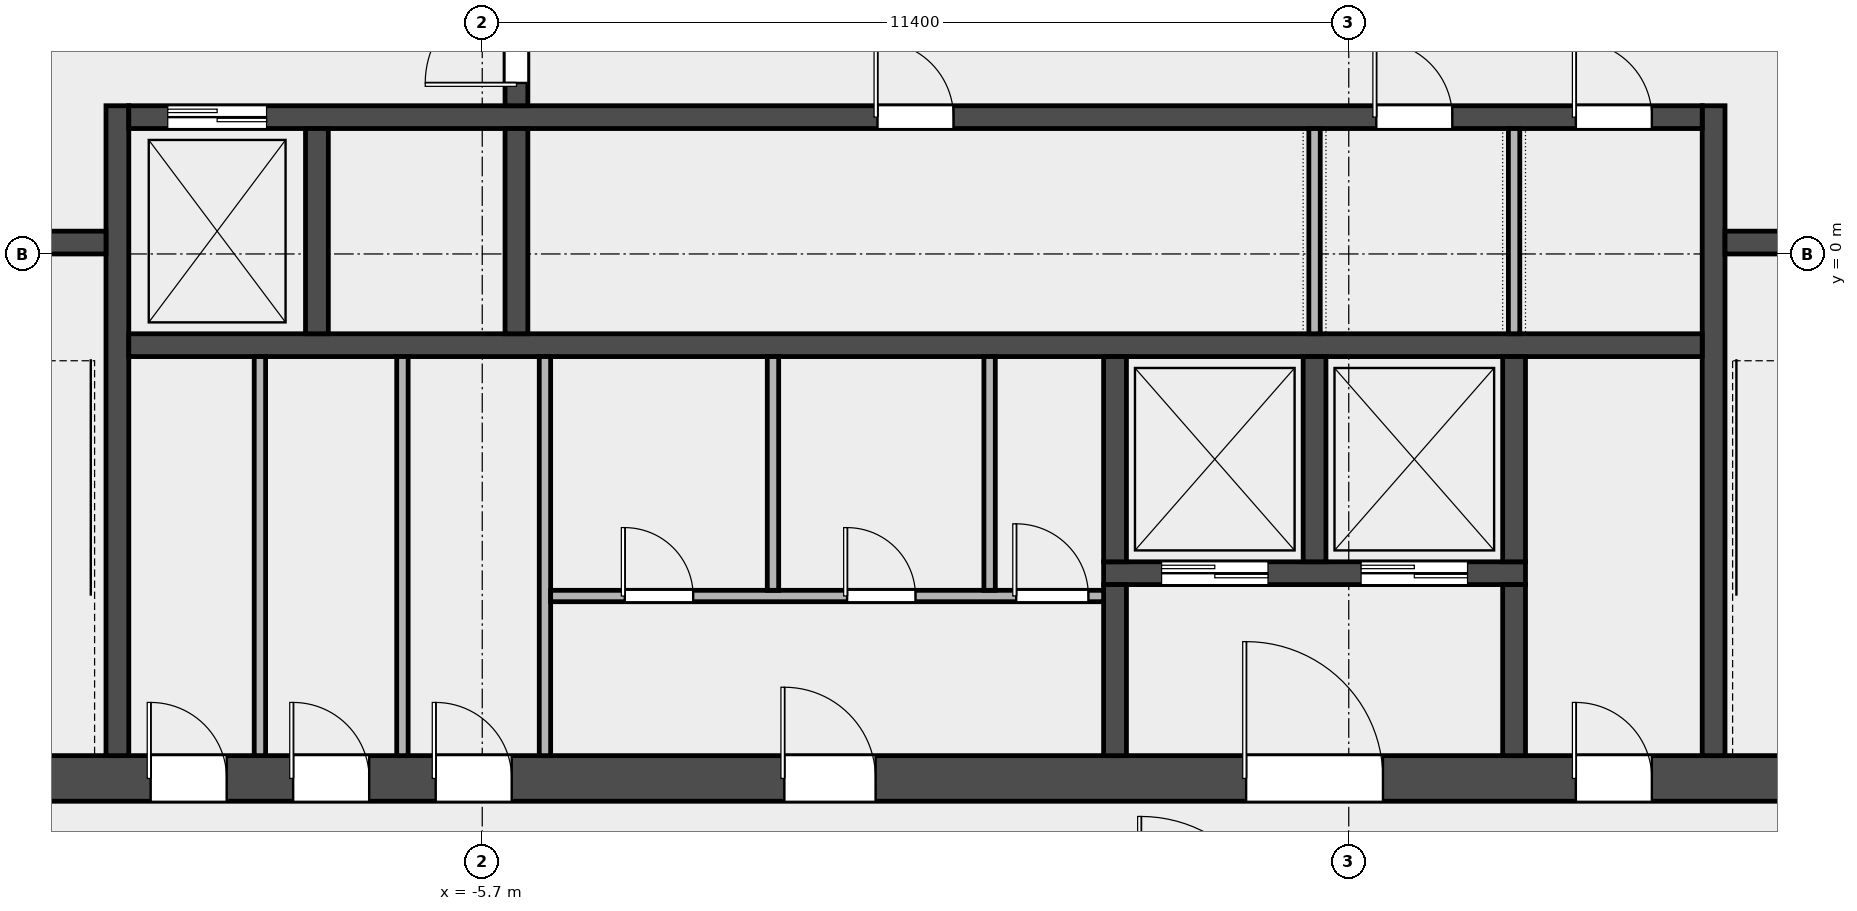
"""IFC4 building model, lengths in metres.
Left out: names, types, materials, properties, quantities, classifications, styles, units other than length and angle.
Written with IfcOpenShell. Run it as: python <this file> out.ifc"""

import sys

from ifc_helpers import new_model, si_unit, direction, frame, frame_2d, origin, place, context, subcontext, project, spatial, rectangle, extrude, element, fill, save


model = new_model("IFC4")
c1 = context("Model", 3, precision=1e-05, world=origin(), true_north=direction((0.0, 1.0)))
c2 = subcontext(c1, "Body", "Model", "MODEL_VIEW")
j1 = project(units=[si_unit("LENGTHUNIT", "METRE"), si_unit("PLANEANGLEUNIT", "RADIAN")], contexts=[c1])
p1 = place(None, origin())
s1 = spatial("IfcSite", under=j1, at=p1, CompositionType="ELEMENT")
p2 = place(p1, origin())
s2 = spatial("IfcBuilding", under=s1, at=p2, CompositionType="ELEMENT")
p3 = place(p2, frame((0.0, 0.0, 227.0)))
s3 = spatial("IfcBuildingStorey", under=s2, at=p3, CompositionType="ELEMENT", Elevation=227.0)
p4 = place(p3, frame((-14.4, -6.9, 0.0), z_axis=(0.0, 0.0, 1.0), x_axis=(1.0, 0.0, 0.0)))
e1 = element("IfcWall", 1, at=p4, inside=s3, PredefinedType="SHEAR", context=c2, shape_type="SweptSolid", body=[
    extrude(rectangle(XDim=28.8, YDim=0.6, at=frame_2d((14.4, 0.0))), origin(), (0.0, 0.0, 1.0), 3.7),
])
p5 = place(p4, frame((4.337, 0.0, 0.0)))
e2 = element("IfcOpeningElement", 2, at=p5, cuts=e1, PredefinedType="OPENING", context=c2, shape_type="SweptSolid", body=[
    extrude(rectangle(XDim=1.0, YDim=2.1, at=frame_2d((0.5, 1.05))), frame((0.0, 0.312, 0.0), z_axis=(0.0, -1.0, 0.0), x_axis=(1.0, 0.0, 0.0)), (0.0, 0.0, 1.0), 0.624),
])
p6 = place(p4, frame((6.212, 0.0, 0.0)))
e3 = element("IfcOpeningElement", 3, at=p6, cuts=e1, PredefinedType="OPENING", context=c2, shape_type="SweptSolid", body=[
    extrude(rectangle(XDim=1.0, YDim=2.1, at=frame_2d((0.5, 1.05))), frame((0.0, 0.312, 0.0), z_axis=(0.0, -1.0, 0.0), x_axis=(1.0, 0.0, 0.0)), (0.0, 0.0, 1.0), 0.624),
])
p7 = place(p4, frame((8.087, 0.0, 0.0)))
e4 = element("IfcOpeningElement", 4, at=p7, cuts=e1, PredefinedType="OPENING", context=c2, shape_type="SweptSolid", body=[
    extrude(rectangle(XDim=1.0, YDim=2.1, at=frame_2d((0.5, 1.05))), frame((0.0, 0.312, 0.0), z_axis=(0.0, -1.0, 0.0), x_axis=(1.0, 0.0, 0.0)), (0.0, 0.0, 1.0), 0.624),
])
p8 = place(p4, frame((12.675, 0.0, 0.0)))
e5 = element("IfcOpeningElement", 5, at=p8, cuts=e1, PredefinedType="OPENING", context=c2, shape_type="SweptSolid", body=[
    extrude(rectangle(XDim=1.2, YDim=2.1, at=frame_2d((0.6, 1.05))), frame((0.0, 0.312, 0.0), z_axis=(0.0, -1.0, 0.0), x_axis=(1.0, 0.0, 0.0)), (0.0, 0.0, 1.0), 0.624),
])
p9 = place(p4, frame((18.75, 0.0, 0.0)))
e6 = element("IfcOpeningElement", 6, at=p9, cuts=e1, PredefinedType="OPENING", context=c2, shape_type="SweptSolid", body=[
    extrude(rectangle(XDim=1.8, YDim=2.1, at=frame_2d((0.9, 1.05))), frame((0.0, 0.312, 0.0), z_axis=(0.0, -1.0, 0.0), x_axis=(1.0, 0.0, 0.0)), (0.0, 0.0, 1.0), 0.624),
])
p10 = place(p4, frame((23.087, 0.0, 0.0)))
e7 = element("IfcOpeningElement", 7, at=p10, cuts=e1, PredefinedType="OPENING", context=c2, shape_type="SweptSolid", body=[
    extrude(rectangle(XDim=1.0, YDim=2.1, at=frame_2d((0.5, 1.05))), frame((0.0, 0.312, 0.0), z_axis=(0.0, -1.0, 0.0), x_axis=(1.0, 0.0, 0.0)), (0.0, 0.0, 1.0), 0.624),
])
for number, where, z_axis, x_axis in (
    (8, (-10.5, -6.6, 0.0), (0.0, 0.0, 1.0), (0.0, 1.0, 0.0)),
    (9, (10.5, -6.6, 0.0), (0.0, 0.0, 1.0), (0.0, 1.0, 0.0)),
):
    element("IfcWall", number, at=place(p3, frame(where, z_axis=z_axis, x_axis=x_axis)), inside=s3, PredefinedType="SHEAR", context=c2, shape_type="SweptSolid", body=[
        extrude(rectangle(XDim=8.55, YDim=0.3, at=frame_2d((4.275, 0.0))), origin(), (0.0, 0.0, 1.0), 3.7),
    ])
p11 = place(p3, frame((-13.8, 0.15, 0.0), z_axis=(0.0, 0.0, 1.0), x_axis=(1.0, 0.0, 0.0)))
e10 = element("IfcWall", 10, at=p11, inside=s3, PredefinedType="SOLIDWALL", context=c2, shape_type="SweptSolid", body=[
    extrude(rectangle(XDim=3.15, YDim=0.3, at=frame_2d((1.575, 0.0))), origin(), (0.0, 0.0, 1.0), 3.7),
])
p12 = place(p11, frame((0.975, 0.0, 0.0)))
e11 = element("IfcOpeningElement", 11, at=p12, cuts=e10, PredefinedType="OPENING", context=c2, shape_type="SweptSolid", body=[
    extrude(rectangle(XDim=1.1, YDim=2.1, at=frame_2d((0.55, 1.05))), frame((0.0, 0.162, 0.0), z_axis=(0.0, -1.0, 0.0), x_axis=(1.0, 0.0, 0.0)), (0.0, 0.0, 1.0), 0.324),
])
p13 = place(p3, frame((10.65, 0.15, 0.0), z_axis=(0.0, 0.0, 1.0), x_axis=(1.0, 0.0, 0.0)))
e12 = element("IfcWall", 12, at=p13, inside=s3, PredefinedType="SOLIDWALL", context=c2, shape_type="SweptSolid", body=[
    extrude(rectangle(XDim=3.15, YDim=0.3, at=frame_2d((1.575, 0.0))), origin(), (0.0, 0.0, 1.0), 3.7),
])
p14 = place(p13, frame((1.025, 0.0, 0.0)))
e13 = element("IfcOpeningElement", 13, at=p14, cuts=e12, PredefinedType="OPENING", context=c2, shape_type="SweptSolid", body=[
    extrude(rectangle(XDim=1.1, YDim=2.1, at=frame_2d((0.55, 1.05))), frame((0.0, 0.162, 0.0), z_axis=(0.0, -1.0, 0.0), x_axis=(1.0, 0.0, 0.0)), (0.0, 0.0, 1.0), 0.324),
])
p15 = place(p3, frame((-10.35, -1.2, 0.0), z_axis=(0.0, 0.0, 1.0), x_axis=(1.0, 0.0, 0.0)))
e14 = element("IfcWall", 14, at=p15, inside=s3, PredefinedType="SOLIDWALL", context=c2, shape_type="SweptSolid", body=[
    extrude(rectangle(XDim=20.7, YDim=0.3, at=frame_2d((10.35, 0.0))), origin(), (0.0, 0.0, 1.0), 3.7),
])
p16 = place(p3, frame((-10.35, 1.8, 0.0), z_axis=(0.0, 0.0, 1.0), x_axis=(1.0, 0.0, 0.0)))
e15 = element("IfcWall", 15, at=p16, inside=s3, PredefinedType="SOLIDWALL", context=c2, shape_type="SweptSolid", body=[
    extrude(rectangle(XDim=20.7, YDim=0.3, at=frame_2d((10.35, 0.0))), origin(), (0.0, 0.0, 1.0), 3.7),
])
p17 = place(p16, frame((0.512, 0.0, 0.0)))
e16 = element("IfcOpeningElement", 16, at=p17, cuts=e15, PredefinedType="OPENING", context=c2, shape_type="SweptSolid", body=[
    extrude(rectangle(XDim=1.3, YDim=2.1, at=frame_2d((0.65, 1.05))), frame((0.0, 0.162, 0.0), z_axis=(0.0, -1.0, 0.0), x_axis=(1.0, 0.0, 0.0)), (0.0, 0.0, 1.0), 0.324),
])
p18 = place(p16, frame((9.85, 0.0, 0.0)))
e17 = element("IfcOpeningElement", 17, at=p18, cuts=e15, PredefinedType="OPENING", context=c2, shape_type="SweptSolid", body=[
    extrude(rectangle(XDim=1.0, YDim=2.1, at=frame_2d((0.5, 1.05))), frame((0.0, 0.162, 0.0), z_axis=(0.0, -1.0, 0.0), x_axis=(1.0, 0.0, 0.0)), (0.0, 0.0, 1.0), 0.324),
])
p19 = place(p16, frame((16.413, 0.0, 0.0)))
e18 = element("IfcOpeningElement", 18, at=p19, cuts=e15, PredefinedType="OPENING", context=c2, shape_type="SweptSolid", body=[
    extrude(rectangle(XDim=1.0, YDim=2.1, at=frame_2d((0.5, 1.05))), frame((0.0, 0.162, 0.0), z_axis=(0.0, -1.0, 0.0), x_axis=(1.0, 0.0, 0.0)), (0.0, 0.0, 1.0), 0.324),
])
p20 = place(p16, frame((19.038, 0.0, 0.0)))
e19 = element("IfcOpeningElement", 19, at=p20, cuts=e15, PredefinedType="OPENING", context=c2, shape_type="SweptSolid", body=[
    extrude(rectangle(XDim=1.0, YDim=2.1, at=frame_2d((0.5, 1.05))), frame((0.0, 0.162, 0.0), z_axis=(0.0, -1.0, 0.0), x_axis=(1.0, 0.0, 0.0)), (0.0, 0.0, 1.0), 0.324),
])
for number, where, z_axis, x_axis in (
    (20, (-7.875, -1.05, 0.0), (0.0, 0.0, 1.0), (0.0, 1.0, 0.0)),
    (21, (-5.25, -1.05, 0.0), (0.0, 0.0, 1.0), (0.0, 1.0, 0.0)),
):
    element("IfcWall", number, at=place(p3, frame(where, z_axis=z_axis, x_axis=x_axis)), inside=s3, PredefinedType="SOLIDWALL", context=c2, shape_type="SweptSolid", body=[
        extrude(rectangle(XDim=2.7, YDim=0.3, at=frame_2d((1.35, 0.0))), origin(), (0.0, 0.0, 1.0), 3.7),
    ])
p21 = place(p3, frame((-5.25, 1.95, 0.0), z_axis=(0.0, 0.0, 1.0), x_axis=(0.0, 1.0, 0.0)))
e22 = element("IfcWall", 22, at=p21, inside=s3, PredefinedType="SOLIDWALL", context=c2, shape_type="SweptSolid", body=[
    extrude(rectangle(XDim=3.3, YDim=0.3, at=frame_2d((1.65, 0.0))), origin(), (0.0, 0.0, 1.0), 3.7),
])
p22 = place(p21, frame((0.3, 0.0, 0.0)))
e23 = element("IfcOpeningElement", 23, at=p22, cuts=e22, PredefinedType="OPENING", context=c2, shape_type="SweptSolid", body=[
    extrude(rectangle(XDim=1.2, YDim=2.1, at=frame_2d((0.6, 1.05))), frame((0.0, 0.162, 0.0), z_axis=(0.0, -1.0, 0.0), x_axis=(1.0, 0.0, 0.0)), (0.0, 0.0, 1.0), 0.324),
])
p23 = place(p21, frame((1.8, 0.0, 0.0)))
e24 = element("IfcOpeningElement", 24, at=p23, cuts=e22, PredefinedType="OPENING", context=c2, shape_type="SweptSolid", body=[
    extrude(rectangle(XDim=1.2, YDim=2.1, at=frame_2d((0.6, 1.05))), frame((0.0, 0.162, 0.0), z_axis=(0.0, -1.0, 0.0), x_axis=(1.0, 0.0, 0.0)), (0.0, 0.0, 1.0), 0.324),
])
p24 = place(p3, frame((2.475, -4.2, 0.0), z_axis=(0.0, 0.0, 1.0), x_axis=(1.0, 0.0, 0.0)))
e25 = element("IfcWall", 25, at=p24, inside=s3, PredefinedType="SOLIDWALL", context=c2, shape_type="SweptSolid", body=[
    extrude(rectangle(XDim=5.55, YDim=0.3, at=frame_2d((2.775, 0.0))), origin(), (0.0, 0.0, 1.0), 3.7),
])
p25 = place(p24, frame((0.762, 0.0, 0.0)))
e26 = element("IfcOpeningElement", 26, at=p25, cuts=e25, PredefinedType="OPENING", context=c2, shape_type="SweptSolid", body=[
    extrude(rectangle(XDim=1.4, YDim=2.1, at=frame_2d((0.7, 1.05))), frame((0.0, 0.162, 0.0), z_axis=(0.0, -1.0, 0.0), x_axis=(1.0, 0.0, 0.0)), (0.0, 0.0, 1.0), 0.324),
])
p26 = place(p24, frame((3.387, 0.0, 0.0)))
e27 = element("IfcOpeningElement", 27, at=p26, cuts=e25, PredefinedType="OPENING", context=c2, shape_type="SweptSolid", body=[
    extrude(rectangle(XDim=1.4, YDim=2.1, at=frame_2d((0.7, 1.05))), frame((0.0, 0.162, 0.0), z_axis=(0.0, -1.0, 0.0), x_axis=(1.0, 0.0, 0.0)), (0.0, 0.0, 1.0), 0.324),
])
p27 = place(p3, frame((2.625, -4.05, 0.0), z_axis=(0.0, 0.0, 1.0), x_axis=(0.0, 1.0, 0.0)))
e28 = element("IfcWall", 28, at=p27, inside=s3, PredefinedType="SOLIDWALL", context=c2, shape_type="SweptSolid", body=[
    extrude(rectangle(XDim=2.7, YDim=0.3, at=frame_2d((1.35, 0.0))), origin(), (0.0, 0.0, 1.0), 3.7),
])
p28 = place(p3, frame((2.625, -6.6, 0.0), z_axis=(0.0, 0.0, 1.0), x_axis=(0.0, 1.0, 0.0)))
e29 = element("IfcWall", 29, at=p28, inside=s3, PredefinedType="SOLIDWALL", context=c2, shape_type="SweptSolid", body=[
    extrude(rectangle(XDim=2.25, YDim=0.3, at=frame_2d((1.125, 0.0))), origin(), (0.0, 0.0, 1.0), 3.7),
])
for number, where, z_axis, x_axis in (
    (30, (5.25, -4.05, 0.0), (0.0, 0.0, 1.0), (0.0, 1.0, 0.0)),
    (31, (7.875, -4.05, 0.0), (0.0, 0.0, 1.0), (0.0, 1.0, 0.0)),
):
    element("IfcWall", number, at=place(p3, frame(where, z_axis=z_axis, x_axis=x_axis)), inside=s3, PredefinedType="SOLIDWALL", context=c2, shape_type="SweptSolid", body=[
        extrude(rectangle(XDim=2.7, YDim=0.3, at=frame_2d((1.35, 0.0))), origin(), (0.0, 0.0, 1.0), 3.7),
    ])
p29 = place(p3, frame((7.875, -6.6, 0.0), z_axis=(0.0, 0.0, 1.0), x_axis=(0.0, 1.0, 0.0)))
e32 = element("IfcWall", 32, at=p29, inside=s3, PredefinedType="SOLIDWALL", context=c2, shape_type="SweptSolid", body=[
    extrude(rectangle(XDim=2.25, YDim=0.3, at=frame_2d((1.125, 0.0))), origin(), (0.0, 0.0, 1.0), 3.7),
])
for number, where, z_axis, x_axis in (
    (33, (-8.625, -6.6, 0.0), (0.0, 0.0, 1.0), (0.0, 1.0, 0.0)),
    (34, (-6.75, -6.6, 0.0), (0.0, 0.0, 1.0), (0.0, 1.0, 0.0)),
    (35, (-4.875, -6.6, 0.0), (0.0, 0.0, 1.0), (0.0, 1.0, 0.0)),
):
    element("IfcWall", number, at=place(p3, frame(where, z_axis=z_axis, x_axis=x_axis)), inside=s3, PredefinedType="PARTITIONING", context=c2, shape_type="SweptSolid", body=[
        extrude(rectangle(XDim=5.25, YDim=0.15, at=frame_2d((2.625, 0.0))), origin(), (0.0, 0.0, 1.0), 3.7),
    ])
p30 = place(p3, frame((-4.8, -4.5, 0.0), z_axis=(0.0, 0.0, 1.0), x_axis=(1.0, 0.0, 0.0)))
e36 = element("IfcWall", 36, at=p30, inside=s3, PredefinedType="PARTITIONING", context=c2, shape_type="SweptSolid", body=[
    extrude(rectangle(XDim=7.275, YDim=0.15, at=frame_2d((3.638, 0.0))), origin(), (0.0, 0.0, 1.0), 3.7),
])
p31 = place(p30, frame((0.975, 0.0, 0.0)))
e37 = element("IfcOpeningElement", 37, at=p31, cuts=e36, PredefinedType="OPENING", context=c2, shape_type="SweptSolid", body=[
    extrude(rectangle(XDim=0.9, YDim=2.1, at=frame_2d((0.45, 1.05))), frame((0.0, 0.087, 0.0), z_axis=(0.0, -1.0, 0.0), x_axis=(1.0, 0.0, 0.0)), (0.0, 0.0, 1.0), 0.174),
])
p32 = place(p30, frame((3.9, 0.0, 0.0)))
e38 = element("IfcOpeningElement", 38, at=p32, cuts=e36, PredefinedType="OPENING", context=c2, shape_type="SweptSolid", body=[
    extrude(rectangle(XDim=0.9, YDim=2.1, at=frame_2d((0.45, 1.05))), frame((0.0, 0.087, 0.0), z_axis=(0.0, -1.0, 0.0), x_axis=(1.0, 0.0, 0.0)), (0.0, 0.0, 1.0), 0.174),
])
p33 = place(p30, frame((6.125, 0.0, 0.0)))
e39 = element("IfcOpeningElement", 39, at=p33, cuts=e36, PredefinedType="OPENING", context=c2, shape_type="SweptSolid", body=[
    extrude(rectangle(XDim=0.95, YDim=2.1, at=frame_2d((0.475, 1.05))), frame((0.0, 0.087, 0.0), z_axis=(0.0, -1.0, 0.0), x_axis=(1.0, 0.0, 0.0)), (0.0, 0.0, 1.0), 0.174),
])
for number, where, z_axis, x_axis in (
    (40, (-1.875, -4.425, 0.0), (0.0, 0.0, 1.0), (0.0, 1.0, 0.0)),
    (41, (0.975, -4.425, 0.0), (0.0, 0.0, 1.0), (0.0, 1.0, 0.0)),
):
    element("IfcWall", number, at=place(p3, frame(where, z_axis=z_axis, x_axis=x_axis)), inside=s3, PredefinedType="PARTITIONING", context=c2, shape_type="SweptSolid", body=[
        extrude(rectangle(XDim=3.075, YDim=0.15, at=frame_2d((1.538, 0.0))), origin(), (0.0, 0.0, 1.0), 3.7),
    ])
for number, where, z_axis, x_axis in (
    (42, (5.25, -1.05, 0.0), (0.0, 0.0, 1.0), (0.0, 1.0, 0.0)),
    (43, (7.875, -1.05, 0.0), (0.0, 0.0, 1.0), (0.0, 1.0, 0.0)),
):
    element("IfcWall", number, at=place(p3, frame(where, z_axis=z_axis, x_axis=x_axis)), inside=s3, PredefinedType="PARTITIONING", context=c2, shape_type="SweptSolid", body=[
        extrude(rectangle(XDim=2.7, YDim=0.15, at=frame_2d((1.35, 0.0))), origin(), (0.0, 0.0, 1.0), 3.7),
    ])
p34 = place(p22, origin())
e44 = element("IfcDoor", 44, at=p34, inside=s3, OperationType="SINGLE_SWING_LEFT", PredefinedType="DOOR", context=c2, shape_type="SweptSolid", body=[
    extrude(rectangle(XDim=1.2, YDim=2.1, at=frame_2d((0.6, 1.05))), frame((0.0, 0.025, 0.0), z_axis=(0.0, -1.0, 0.0), x_axis=(1.0, 0.0, 0.0)), (0.0, 0.0, 1.0), 0.05),
])
fill(e23, e44)
p35 = place(p17, origin())
e45 = element("IfcDoor", 45, at=p35, inside=s3, OperationType="DOUBLE_DOOR_SLIDING", PredefinedType="DOOR", context=c2, shape_type="SweptSolid", body=[
    extrude(rectangle(XDim=1.3, YDim=2.1, at=frame_2d((0.65, 1.05))), frame((0.0, 0.025, 0.0), z_axis=(0.0, -1.0, 0.0), x_axis=(1.0, 0.0, 0.0)), (0.0, 0.0, 1.0), 0.05),
])
fill(e16, e45)
p36 = place(p25, origin())
e46 = element("IfcDoor", 46, at=p36, inside=s3, OperationType="DOUBLE_DOOR_SLIDING", PredefinedType="DOOR", context=c2, shape_type="SweptSolid", body=[
    extrude(rectangle(XDim=1.4, YDim=2.1, at=frame_2d((0.7, 1.05))), frame((0.0, 0.025, 0.0), z_axis=(0.0, -1.0, 0.0), x_axis=(1.0, 0.0, 0.0)), (0.0, 0.0, 1.0), 0.05),
])
fill(e26, e46)
p37 = place(p26, origin())
e47 = element("IfcDoor", 47, at=p37, inside=s3, OperationType="DOUBLE_DOOR_SLIDING", PredefinedType="DOOR", context=c2, shape_type="SweptSolid", body=[
    extrude(rectangle(XDim=1.4, YDim=2.1, at=frame_2d((0.7, 1.05))), frame((0.0, 0.025, 0.0), z_axis=(0.0, -1.0, 0.0), x_axis=(1.0, 0.0, 0.0)), (0.0, 0.0, 1.0), 0.05),
])
fill(e27, e47)
p38 = place(p5, origin())
e48 = element("IfcDoor", 48, at=p38, inside=s3, OperationType="SINGLE_SWING_LEFT", PredefinedType="DOOR", context=c2, shape_type="SweptSolid", body=[
    extrude(rectangle(XDim=1.0, YDim=2.1, at=frame_2d((0.5, 1.05))), frame((0.0, 0.025, 0.0), z_axis=(0.0, -1.0, 0.0), x_axis=(1.0, 0.0, 0.0)), (0.0, 0.0, 1.0), 0.05),
])
fill(e2, e48)
p39 = place(p6, origin())
e49 = element("IfcDoor", 49, at=p39, inside=s3, OperationType="SINGLE_SWING_LEFT", PredefinedType="DOOR", context=c2, shape_type="SweptSolid", body=[
    extrude(rectangle(XDim=1.0, YDim=2.1, at=frame_2d((0.5, 1.05))), frame((0.0, 0.025, 0.0), z_axis=(0.0, -1.0, 0.0), x_axis=(1.0, 0.0, 0.0)), (0.0, 0.0, 1.0), 0.05),
])
fill(e3, e49)
p40 = place(p7, origin())
e50 = element("IfcDoor", 50, at=p40, inside=s3, OperationType="SINGLE_SWING_LEFT", PredefinedType="DOOR", context=c2, shape_type="SweptSolid", body=[
    extrude(rectangle(XDim=1.0, YDim=2.1, at=frame_2d((0.5, 1.05))), frame((0.0, 0.025, 0.0), z_axis=(0.0, -1.0, 0.0), x_axis=(1.0, 0.0, 0.0)), (0.0, 0.0, 1.0), 0.05),
])
fill(e4, e50)
p41 = place(p8, origin())
e51 = element("IfcDoor", 51, at=p41, inside=s3, OperationType="SINGLE_SWING_LEFT", PredefinedType="DOOR", context=c2, shape_type="SweptSolid", body=[
    extrude(rectangle(XDim=1.2, YDim=2.1, at=frame_2d((0.6, 1.05))), frame((0.0, 0.025, 0.0), z_axis=(0.0, -1.0, 0.0), x_axis=(1.0, 0.0, 0.0)), (0.0, 0.0, 1.0), 0.05),
])
fill(e5, e51)
p42 = place(p31, origin())
e52 = element("IfcDoor", 52, at=p42, inside=s3, OperationType="SINGLE_SWING_LEFT", PredefinedType="DOOR", context=c2, shape_type="SweptSolid", body=[
    extrude(rectangle(XDim=0.9, YDim=2.1, at=frame_2d((0.45, 1.05))), frame((0.0, 0.025, 0.0), z_axis=(0.0, -1.0, 0.0), x_axis=(1.0, 0.0, 0.0)), (0.0, 0.0, 1.0), 0.05),
])
fill(e37, e52)
p43 = place(p32, origin())
e53 = element("IfcDoor", 53, at=p43, inside=s3, OperationType="SINGLE_SWING_LEFT", PredefinedType="DOOR", context=c2, shape_type="SweptSolid", body=[
    extrude(rectangle(XDim=0.9, YDim=2.1, at=frame_2d((0.45, 1.05))), frame((0.0, 0.025, 0.0), z_axis=(0.0, -1.0, 0.0), x_axis=(1.0, 0.0, 0.0)), (0.0, 0.0, 1.0), 0.05),
])
fill(e38, e53)
p44 = place(p33, origin())
e54 = element("IfcDoor", 54, at=p44, inside=s3, OperationType="SINGLE_SWING_LEFT", PredefinedType="DOOR", context=c2, shape_type="SweptSolid", body=[
    extrude(rectangle(XDim=0.95, YDim=2.1, at=frame_2d((0.475, 1.05))), frame((0.0, 0.025, 0.0), z_axis=(0.0, -1.0, 0.0), x_axis=(1.0, 0.0, 0.0)), (0.0, 0.0, 1.0), 0.05),
])
fill(e39, e54)
p45 = place(p9, origin())
e55 = element("IfcDoor", 55, at=p45, inside=s3, OperationType="DOUBLE_DOOR_SINGLE_SWING", PredefinedType="DOOR", context=c2, shape_type="SweptSolid", body=[
    extrude(rectangle(XDim=1.8, YDim=2.1, at=frame_2d((0.9, 1.05))), frame((0.0, 0.025, 0.0), z_axis=(0.0, -1.0, 0.0), x_axis=(1.0, 0.0, 0.0)), (0.0, 0.0, 1.0), 0.05),
])
fill(e6, e55)
p46 = place(p10, origin())
e56 = element("IfcDoor", 56, at=p46, inside=s3, OperationType="SINGLE_SWING_LEFT", PredefinedType="DOOR", context=c2, shape_type="SweptSolid", body=[
    extrude(rectangle(XDim=1.0, YDim=2.1, at=frame_2d((0.5, 1.05))), frame((0.0, 0.025, 0.0), z_axis=(0.0, -1.0, 0.0), x_axis=(1.0, 0.0, 0.0)), (0.0, 0.0, 1.0), 0.05),
])
fill(e7, e56)
p47 = place(p18, origin())
e57 = element("IfcDoor", 57, at=p47, inside=s3, OperationType="SINGLE_SWING_LEFT", PredefinedType="DOOR", context=c2, shape_type="SweptSolid", body=[
    extrude(rectangle(XDim=1.0, YDim=2.1, at=frame_2d((0.5, 1.05))), frame((0.0, 0.025, 0.0), z_axis=(0.0, -1.0, 0.0), x_axis=(1.0, 0.0, 0.0)), (0.0, 0.0, 1.0), 0.05),
])
fill(e17, e57)
p48 = place(p19, origin())
e58 = element("IfcDoor", 58, at=p48, inside=s3, OperationType="SINGLE_SWING_LEFT", PredefinedType="DOOR", context=c2, shape_type="SweptSolid", body=[
    extrude(rectangle(XDim=1.0, YDim=2.1, at=frame_2d((0.5, 1.05))), frame((0.0, 0.025, 0.0), z_axis=(0.0, -1.0, 0.0), x_axis=(1.0, 0.0, 0.0)), (0.0, 0.0, 1.0), 0.05),
])
fill(e18, e58)
p49 = place(p20, origin())
e59 = element("IfcDoor", 59, at=p49, inside=s3, OperationType="SINGLE_SWING_LEFT", PredefinedType="DOOR", context=c2, shape_type="SweptSolid", body=[
    extrude(rectangle(XDim=1.0, YDim=2.1, at=frame_2d((0.5, 1.05))), frame((0.0, 0.025, 0.0), z_axis=(0.0, -1.0, 0.0), x_axis=(1.0, 0.0, 0.0)), (0.0, 0.0, 1.0), 0.05),
])
fill(e19, e59)
save(model, sys.argv[1])
